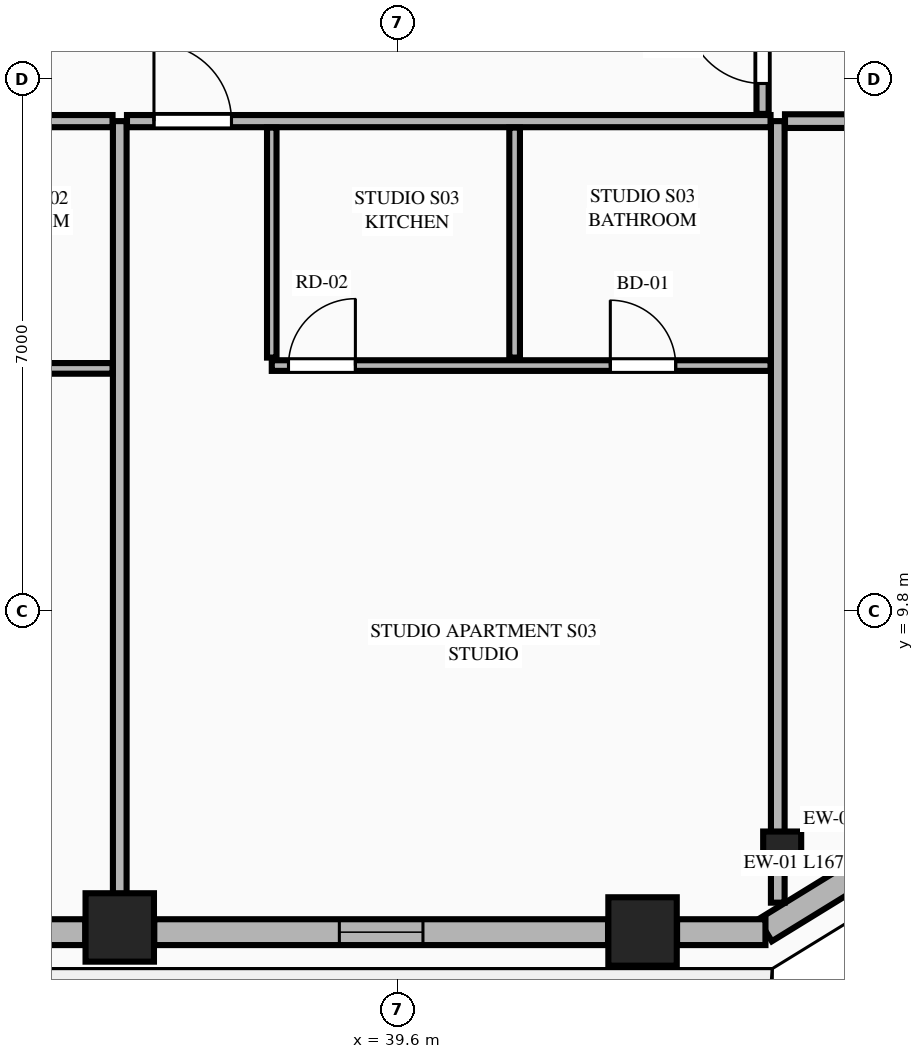
"""IFC4 building model, lengths in metres.
Left out: names, types, materials, properties, quantities, classifications, styles, units other than length and angle.
Written with IfcOpenShell. Run it as: python <this file> out.ifc"""

import sys

from ifc_helpers import new_model, si_unit, direction, frame, frame_2d, origin, origin_2d, place, context, subcontext, project, spatial, rectangle, extrude, element, fill, save


model = new_model("IFC4")
c1 = context("Model", 3, precision=1e-05, world=origin(), true_north=direction((0.0, 1.0)))
c2 = subcontext(c1, "Body", "Model", "MODEL_VIEW")
j1 = project(units=[si_unit("LENGTHUNIT", "METRE"), si_unit("PLANEANGLEUNIT", "RADIAN")], contexts=[c1])
p1 = place(None, origin())
s1 = spatial("IfcSite", under=j1, at=p1, CompositionType="ELEMENT")
p2 = place(p1, origin())
s2 = spatial("IfcBuilding", under=s1, at=p2, CompositionType="ELEMENT")
p3 = place(p2, frame((0.0, 0.0, 200.3)))
s3 = spatial("IfcBuildingStorey", under=s2, at=p3, CompositionType="ELEMENT", Elevation=200.3)
for number, where, z_axis, x_axis in (
    (1, (35.943, 5.642, 0.0), (0.0, 0.0, 1.0), (1.0, 0.0, 0.0)),
    (2, (42.821, 5.589, 0.0), (0.0, 0.0, 1.0), (1.0, 0.0, 0.0)),
):
    element("IfcColumn", number, at=place(p3, frame(where, z_axis=z_axis, x_axis=x_axis)), inside=s3, PredefinedType="COLUMN", context=c2, shape_type="SweptSolid", body=[
        extrude(rectangle(XDim=0.9, YDim=0.9, at=origin_2d()), origin(), (0.0, 0.0, 1.0), 3.55),
    ])
p4 = place(p3, frame((44.658, 6.654, 0.0), z_axis=(0.0, 0.0, 1.0), x_axis=(0.865230187018, 0.501374833306, 0.0)))
e3 = element("IfcColumn", 3, at=p4, inside=s3, PredefinedType="PILASTER", context=c2, shape_type="SweptSolid", body=[
    extrude(rectangle(XDim=0.5, YDim=0.35, at=origin_2d()), origin(), (0.0, 0.0, 1.0), 3.55),
])
p5 = place(p3, frame((44.433, 5.605, 0.0), z_axis=(0.0, 0.0, 1.0), x_axis=(0.851778214877, 0.523902541185, 0.0)))
e4 = element("IfcWall", 4, at=p5, inside=s3, PredefinedType="STANDARD", context=c2, shape_type="SweptSolid", body=[
    extrude(rectangle(XDim=1.678, YDim=0.34, at=frame_2d((0.839, 0.0))), origin(), (0.0, 0.0, 1.0), 3.35),
])
p6 = place(p3, frame((29.311, 5.58, 0.0), z_axis=(0.0, 0.0, 1.0), x_axis=(1.0, 0.0, 0.0)))
e5 = element("IfcWall", 5, at=p6, inside=s3, PredefinedType="STANDARD", context=c2, shape_type="SweptSolid", body=[
    extrude(rectangle(XDim=6.178, YDim=0.34, at=frame_2d((3.089, 0.0))), origin(), (0.0, 0.0, 1.0), 2.883),
])
p7 = place(p6, frame((2.539, 0.0, 0.0)))
e6 = element("IfcOpeningElement", 6, at=p7, cuts=e5, PredefinedType="OPENING", context=c2, shape_type="SweptSolid", body=[
    extrude(rectangle(XDim=1.1, YDim=2.25, at=frame_2d((0.55, 1.125))), frame((0.0, 0.18, 0.0), z_axis=(0.0, -1.0, 0.0), x_axis=(1.0, 0.0, 0.0)), (0.0, 0.0, 1.0), 0.36),
])
p8 = place(p3, frame((36.397, 5.58, 0.0), z_axis=(0.0, 0.0, 1.0), x_axis=(1.0, 0.0, 0.0)))
e7 = element("IfcWall", 7, at=p8, inside=s3, PredefinedType="STANDARD", context=c2, shape_type="SweptSolid", body=[
    extrude(rectangle(XDim=5.97, YDim=0.34, at=frame_2d((2.985, 0.0))), origin(), (0.0, 0.0, 1.0), 2.883),
])
p9 = place(p8, frame((2.435, 0.0, 0.75)))
e8 = element("IfcOpeningElement", 8, at=p9, cuts=e7, PredefinedType="OPENING", context=c2, shape_type="SweptSolid", body=[
    extrude(rectangle(XDim=1.1, YDim=1.983, at=frame_2d((0.55, 0.991))), frame((0.0, 0.18, 0.0), z_axis=(0.0, -1.0, 0.0), x_axis=(1.0, 0.0, 0.0)), (0.0, 0.0, 1.0), 0.36),
])
p10 = place(p3, frame((43.275, 5.58, 0.0), z_axis=(0.0, 0.0, 1.0), x_axis=(1.0, 0.0, 0.0)))
e9 = element("IfcWall", 9, at=p10, inside=s3, PredefinedType="STANDARD", context=c2, shape_type="SweptSolid", body=[
    extrude(rectangle(XDim=1.163, YDim=0.34, at=frame_2d((0.582, 0.0))), origin(), (0.0, 0.0, 1.0), 3.35),
])
p11 = place(p3, frame((35.943, 5.755, 0.0), z_axis=(0.0, 0.0, 1.0), x_axis=(0.0, 1.0, 0.0)))
e10 = element("IfcWall", 10, at=p11, inside=s3, PredefinedType="PARTITIONING", context=c2, shape_type="SweptSolid", body=[
    extrude(rectangle(XDim=10.495, YDim=0.18, at=frame_2d((5.248, 0.0))), origin(), (0.0, 0.0, 1.0), 2.807),
])
p12 = place(p3, frame((44.6, 5.968, 0.0), z_axis=(0.0, 0.0, 1.0), x_axis=(0.0, 1.0, 0.0)))
e11 = element("IfcWall", 11, at=p12, inside=s3, PredefinedType="PARTITIONING", context=c2, shape_type="SweptSolid", body=[
    extrude(rectangle(XDim=10.282, YDim=0.18, at=frame_2d((5.141, 0.0))), origin(), (0.0, 0.0, 1.0), 3.35),
])
p13 = place(p3, frame((28.952, 16.25, 0.0), z_axis=(0.0, 0.0, 1.0), x_axis=(1.0, 0.0, 0.0)))
e12 = element("IfcWall", 12, at=p13, inside=s3, PredefinedType="PARTITIONING", context=c2, shape_type="SweptSolid", body=[
    extrude(rectangle(XDim=6.896, YDim=0.16, at=frame_2d((3.448, 0.0))), origin(), (0.0, 0.0, 1.0), 3.35),
])
p14 = place(p13, frame((0.355, 0.0, 0.0)))
e13 = element("IfcOpeningElement", 13, at=p14, cuts=e12, PredefinedType="OPENING", context=c2, shape_type="SweptSolid", body=[
    extrude(rectangle(XDim=1.02, YDim=2.25, at=frame_2d((0.51, 1.125))), frame((0.0, 0.09, 0.0), z_axis=(0.0, -1.0, 0.0), x_axis=(1.0, 0.0, 0.0)), (0.0, 0.0, 1.0), 0.18),
])
p15 = place(p3, frame((30.857, 12.997, 0.0), z_axis=(0.0, 0.0, 1.0), x_axis=(1.0, 0.0, 0.0)))
e14 = element("IfcWall", 14, at=p15, inside=s3, PredefinedType="PLUMBINGWALL", context=c2, shape_type="SweptSolid", body=[
    extrude(rectangle(XDim=4.991, YDim=0.14, at=frame_2d((2.496, 0.0))), origin(), (0.0, 0.0, 1.0), 3.35),
])
p16 = place(p15, frame((3.291, 0.0, 0.0)))
e15 = element("IfcOpeningElement", 15, at=p16, cuts=e14, PredefinedType="OPENING", context=c2, shape_type="SweptSolid", body=[
    extrude(rectangle(XDim=0.86, YDim=2.1, at=frame_2d((0.43, 1.05))), frame((0.0, 0.08, 0.0), z_axis=(0.0, -1.0, 0.0), x_axis=(1.0, 0.0, 0.0)), (0.0, 0.0, 1.0), 0.16),
])
p17 = place(p15, frame((0.22, 0.0, 0.0)))
e16 = element("IfcOpeningElement", 16, at=p17, cuts=e14, PredefinedType="OPENING", context=c2, shape_type="SweptSolid", body=[
    extrude(rectangle(XDim=0.88, YDim=2.15, at=frame_2d((0.44, 1.075))), frame((0.0, 0.08, 0.0), z_axis=(0.0, -1.0, 0.0), x_axis=(1.0, 0.0, 0.0)), (0.0, 0.0, 1.0), 0.16),
])
p18 = place(p3, frame((36.038, 16.25, 0.0), z_axis=(0.0, 0.0, 1.0), x_axis=(1.0, 0.0, 0.0)))
e17 = element("IfcWall", 17, at=p18, inside=s3, PredefinedType="PARTITIONING", context=c2, shape_type="SweptSolid", body=[
    extrude(rectangle(XDim=8.467, YDim=0.16, at=frame_2d((4.233, 0.0))), origin(), (0.0, 0.0, 1.0), 3.35),
])
p19 = place(p18, frame((0.355, 0.0, 0.0)))
e18 = element("IfcOpeningElement", 18, at=p19, cuts=e17, PredefinedType="OPENING", context=c2, shape_type="SweptSolid", body=[
    extrude(rectangle(XDim=1.02, YDim=2.25, at=frame_2d((0.51, 1.125))), frame((0.0, 0.09, 0.0), z_axis=(0.0, -1.0, 0.0), x_axis=(1.0, 0.0, 0.0)), (0.0, 0.0, 1.0), 0.18),
])
p20 = place(p3, frame((37.943, 13.139, 0.0), z_axis=(0.0, 0.0, 1.0), x_axis=(0.0, 1.0, 0.0)))
e19 = element("IfcWall", 19, at=p20, inside=s3, PredefinedType="PARTITIONING", context=c2, shape_type="SweptSolid", body=[
    extrude(rectangle(XDim=3.026, YDim=0.125, at=frame_2d((1.513, 0.0))), origin(), (0.0, 0.0, 1.0), 3.35),
])
p21 = place(p3, frame((37.943, 13.034, 0.0), z_axis=(0.0, 0.0, 1.0), x_axis=(1.0, 0.0, 0.0)))
e20 = element("IfcWall", 20, at=p21, inside=s3, PredefinedType="PLUMBINGWALL", context=c2, shape_type="SweptSolid", body=[
    extrude(rectangle(XDim=6.562, YDim=0.14, at=frame_2d((3.281, 0.0))), origin(), (0.0, 0.0, 1.0), 3.35),
])
p22 = place(p21, frame((4.454, 0.0, 0.0)))
e21 = element("IfcOpeningElement", 21, at=p22, cuts=e20, PredefinedType="OPENING", context=c2, shape_type="SweptSolid", body=[
    extrude(rectangle(XDim=0.86, YDim=2.1, at=frame_2d((0.43, 1.05))), frame((0.0, 0.08, 0.0), z_axis=(0.0, -1.0, 0.0), x_axis=(1.0, 0.0, 0.0)), (0.0, 0.0, 1.0), 0.16),
])
p23 = place(p21, frame((0.22, 0.0, 0.0)))
e22 = element("IfcOpeningElement", 22, at=p23, cuts=e20, PredefinedType="OPENING", context=c2, shape_type="SweptSolid", body=[
    extrude(rectangle(XDim=0.88, YDim=2.15, at=frame_2d((0.44, 1.075))), frame((0.0, 0.08, 0.0), z_axis=(0.0, -1.0, 0.0), x_axis=(1.0, 0.0, 0.0)), (0.0, 0.0, 1.0), 0.16),
])
p24 = place(p3, frame((41.138, 13.139, 0.0), z_axis=(0.0, 0.0, 1.0), x_axis=(0.0, 1.0, 0.0)))
e23 = element("IfcWall", 23, at=p24, inside=s3, PredefinedType="PLUMBINGWALL", context=c2, shape_type="SweptSolid", body=[
    extrude(rectangle(XDim=3.026, YDim=0.14, at=frame_2d((1.513, 0.0))), origin(), (0.0, 0.0, 1.0), 3.35),
])
p25 = place(p3, frame((44.695, 16.25, 0.0), z_axis=(0.0, 0.0, 1.0), x_axis=(1.0, 0.0, 0.0)))
e24 = element("IfcWall", 24, at=p25, inside=s3, PredefinedType="PARTITIONING", context=c2, shape_type="SweptSolid", body=[
    extrude(rectangle(XDim=5.894, YDim=0.18, at=frame_2d((2.947, 0.0))), origin(), (0.0, 0.0, 1.0), 3.35),
])
p26 = place(p3, frame((44.4, 16.345, 0.0), z_axis=(0.0, 0.0, 1.0), x_axis=(0.0, 1.0, 0.0)))
e25 = element("IfcWall", 25, at=p26, inside=s3, PredefinedType="PARTITIONING", context=c2, shape_type="SweptSolid", body=[
    extrude(rectangle(XDim=6.236, YDim=0.16, at=frame_2d((3.118, 0.0))), origin(), (0.0, 0.0, 1.0), 3.35),
])
p27 = place(p26, frame((0.4, 0.0, 0.0)))
e26 = element("IfcOpeningElement", 26, at=p27, cuts=e25, PredefinedType="OPENING", context=c2, shape_type="SweptSolid", body=[
    extrude(rectangle(XDim=1.02, YDim=2.25, at=frame_2d((0.51, 1.125))), frame((0.0, 0.09, 0.0), z_axis=(0.0, -1.0, 0.0), x_axis=(1.0, 0.0, 0.0)), (0.0, 0.0, 1.0), 0.18),
])
p28 = place(p9, origin())
e27 = element("IfcWindow", 27, at=p28, inside=s3, PartitioningType="SINGLE_PANEL", PredefinedType="WINDOW", context=c2, shape_type="SweptSolid", body=[
    extrude(rectangle(XDim=1.1, YDim=1.983, at=frame_2d((0.55, 0.991))), frame((0.0, 0.03, 0.0), z_axis=(0.0, -1.0, 0.0), x_axis=(1.0, 0.0, 0.0)), (0.0, 0.0, 1.0), 0.06),
])
fill(e8, e27)
p29 = place(p22, origin())
e28 = element("IfcDoor", 28, at=p29, inside=s3, OperationType="SINGLE_SWING_LEFT", PredefinedType="DOOR", context=c2, shape_type="SweptSolid", body=[
    extrude(rectangle(XDim=0.86, YDim=2.1, at=frame_2d((0.43, 1.05))), frame((0.0, 0.025, 0.0), z_axis=(0.0, -1.0, 0.0), x_axis=(1.0, 0.0, 0.0)), (0.0, 0.0, 1.0), 0.05),
])
fill(e21, e28)
p30 = place(p19, origin())
e29 = element("IfcDoor", 29, at=p30, inside=s3, OperationType="SINGLE_SWING_LEFT", PredefinedType="DOOR", context=c2, shape_type="SweptSolid", body=[
    extrude(rectangle(XDim=1.02, YDim=2.25, at=frame_2d((0.51, 1.125))), frame((0.0, 0.025, 0.0), z_axis=(0.0, -1.0, 0.0), x_axis=(1.0, 0.0, 0.0)), (0.0, 0.0, 1.0), 0.05),
])
fill(e18, e29)
p31 = place(p23, origin())
e30 = element("IfcDoor", 30, at=p31, inside=s3, OperationType="SINGLE_SWING_RIGHT", PredefinedType="DOOR", context=c2, shape_type="SweptSolid", body=[
    extrude(rectangle(XDim=0.88, YDim=2.15, at=frame_2d((0.44, 1.075))), frame((0.0, 0.025, 0.0), z_axis=(0.0, -1.0, 0.0), x_axis=(1.0, 0.0, 0.0)), (0.0, 0.0, 1.0), 0.05),
])
fill(e22, e30)
p32 = place(p27, origin())
e31 = element("IfcDoor", 31, at=p32, inside=s3, OperationType="SINGLE_SWING_RIGHT", PredefinedType="DOOR", context=c2, shape_type="SweptSolid", body=[
    extrude(rectangle(XDim=1.02, YDim=2.25, at=frame_2d((0.51, 1.125))), frame((0.0, 0.025, 0.0), z_axis=(0.0, -1.0, 0.0), x_axis=(1.0, 0.0, 0.0)), (0.0, 0.0, 1.0), 0.05),
])
fill(e26, e31)
save(model, sys.argv[1])
